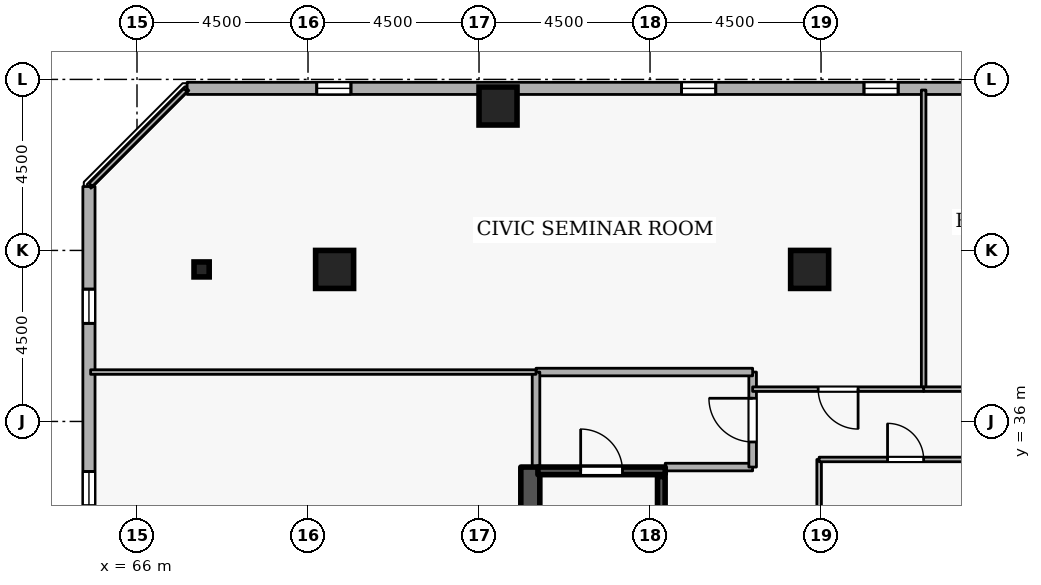
"""IFC4 building model, lengths in metres.
Left out: names, types, materials, properties, quantities, classifications, styles, units other than length and angle.
Written with IfcOpenShell. Run it as: python <this file> out.ifc"""

import sys

from ifc_helpers import new_model, si_unit, direction, frame, frame_2d, origin, origin_2d, place, context, subcontext, project, spatial, rectangle, i_section, extrude, element, fill, save


model = new_model("IFC4")
c1 = context("Model", 3, precision=1e-05, world=origin(), true_north=direction((0.0, 1.0)))
c2 = subcontext(c1, "Body", "Model", "MODEL_VIEW")
j1 = project(units=[si_unit("LENGTHUNIT", "METRE"), si_unit("PLANEANGLEUNIT", "RADIAN")], contexts=[c1])
p1 = place(None, origin())
s1 = spatial("IfcSite", under=j1, at=p1, CompositionType="ELEMENT")
p2 = place(p1, origin())
s2 = spatial("IfcBuilding", under=s1, at=p2, CompositionType="ELEMENT")
p3 = place(p2, frame((0.0, 0.0, 214.5)))
s3 = spatial("IfcBuildingStorey", under=s2, at=p3, CompositionType="ELEMENT", Elevation=214.5)
p4 = place(p3, frame((76.35, 19.2, 0.0), z_axis=(0.0, 0.0, 1.0), x_axis=(0.0, 1.0, 0.0)))
e1 = element("IfcWall", 1, at=p4, inside=s3, PredefinedType="SHEAR", context=c2, shape_type="SweptSolid", body=[
    extrude(rectangle(XDim=15.6, YDim=0.5, at=frame_2d((7.8, 0.0))), origin(), (0.0, 0.0, 1.0), 3.6),
])
for number, where, z_axis, x_axis in (
    (2, (75.5, 44.3, 0.0), (0.0, 0.0, 1.0), (1.0, 0.0, 0.0)),
    (3, (71.2, 40.0, 0.0), (0.0, 0.0, 1.0), (1.0, 0.0, 0.0)),
    (4, (83.7, 40.0, 0.0), (0.0, 0.0, 1.0), (1.0, 0.0, 0.0)),
):
    element("IfcColumn", number, at=place(p3, frame(where, z_axis=z_axis, x_axis=x_axis)), inside=s3, PredefinedType="COLUMN", context=c2, shape_type="SweptSolid", body=[
        extrude(rectangle(XDim=1.0, YDim=1.0, at=origin_2d()), origin(), (0.0, 0.0, 1.0), 3.6),
    ])
p5 = place(p3, frame((67.7, 40.0, 0.0), z_axis=(0.0, 0.0, 1.0), x_axis=(1.0, 0.0, 0.0)))
e5 = element("IfcColumn", 5, at=p5, inside=s3, PredefinedType="COLUMN", context=c2, shape_type="SweptSolid", body=[
    extrude(i_section(OverallWidth=0.399, OverallDepth=0.394, WebThickness=0.023, FlangeThickness=0.037, FilletRadius=0.015, at=origin_2d()), origin(), (0.0, 0.0, 1.0), 3.6),
])
p6 = place(p3, frame((103.129, 44.763, 0.0), z_axis=(0.0, 0.0, 1.0), x_axis=(-0.999999998513, 5.4540124e-05, 0.0)))
e6 = element("IfcWall", 6, at=p6, inside=s3, PredefinedType="STANDARD", context=c2, shape_type="SweptSolid", body=[
    extrude(rectangle(XDim=35.811, YDim=0.32, at=frame_2d((17.905, 0.0))), origin(), (0.0, 0.0, 1.0), 2.7),
])
p7 = place(p6, frame((2.7, 0.0, 0.72)))
e7 = element("IfcOpeningElement", 7, at=p7, cuts=e6, PredefinedType="OPENING", context=c2, shape_type="SweptSolid", body=[
    extrude(rectangle(XDim=0.9, YDim=1.75, at=frame_2d((0.45, 0.875))), frame((0.0, 0.17, 0.0), z_axis=(0.0, -1.0, 0.0), x_axis=(1.0, 0.0, 0.0)), (0.0, 0.0, 1.0), 0.34),
])
p8 = place(p6, frame((7.5, 0.0, 0.72)))
e8 = element("IfcOpeningElement", 8, at=p8, cuts=e6, PredefinedType="OPENING", context=c2, shape_type="SweptSolid", body=[
    extrude(rectangle(XDim=0.9, YDim=1.75, at=frame_2d((0.45, 0.875))), frame((0.0, 0.17, 0.0), z_axis=(0.0, -1.0, 0.0), x_axis=(1.0, 0.0, 0.0)), (0.0, 0.0, 1.0), 0.34),
])
p9 = place(p6, frame((12.3, 0.0, 0.72)))
e9 = element("IfcOpeningElement", 9, at=p9, cuts=e6, PredefinedType="OPENING", context=c2, shape_type="SweptSolid", body=[
    extrude(rectangle(XDim=0.9, YDim=1.75, at=frame_2d((0.45, 0.875))), frame((0.0, 0.17, 0.0), z_axis=(0.0, -1.0, 0.0), x_axis=(1.0, 0.0, 0.0)), (0.0, 0.0, 1.0), 0.34),
])
p10 = place(p6, frame((17.1, 0.0, 0.72)))
e10 = element("IfcOpeningElement", 10, at=p10, cuts=e6, PredefinedType="OPENING", context=c2, shape_type="SweptSolid", body=[
    extrude(rectangle(XDim=0.9, YDim=1.75, at=frame_2d((0.45, 0.875))), frame((0.0, 0.17, 0.0), z_axis=(0.0, -1.0, 0.0), x_axis=(1.0, 0.0, 0.0)), (0.0, 0.0, 1.0), 0.34),
])
p11 = place(p6, frame((21.9, 0.0, 0.72)))
e11 = element("IfcOpeningElement", 11, at=p11, cuts=e6, PredefinedType="OPENING", context=c2, shape_type="SweptSolid", body=[
    extrude(rectangle(XDim=0.9, YDim=1.75, at=frame_2d((0.45, 0.875))), frame((0.0, 0.17, 0.0), z_axis=(0.0, -1.0, 0.0), x_axis=(1.0, 0.0, 0.0)), (0.0, 0.0, 1.0), 0.34),
])
p12 = place(p6, frame((31.5, 0.0, 0.72)))
e12 = element("IfcOpeningElement", 12, at=p12, cuts=e6, PredefinedType="OPENING", context=c2, shape_type="SweptSolid", body=[
    extrude(rectangle(XDim=0.9, YDim=1.75, at=frame_2d((0.45, 0.875))), frame((0.0, 0.17, 0.0), z_axis=(0.0, -1.0, 0.0), x_axis=(1.0, 0.0, 0.0)), (0.0, 0.0, 1.0), 0.34),
])
p13 = place(p3, frame((64.735, 42.181, 0.0), z_axis=(0.0, 0.0, 1.0), x_axis=(5.4540124e-05, -0.999999998513, 0.0)))
e13 = element("IfcWall", 13, at=p13, inside=s3, PredefinedType="STANDARD", context=c2, shape_type="SweptSolid", body=[
    extrude(rectangle(XDim=35.811, YDim=0.32, at=frame_2d((17.905, 0.0))), origin(), (0.0, 0.0, 1.0), 2.7),
])
p14 = place(p13, frame((2.7, 0.0, 0.72)))
e14 = element("IfcOpeningElement", 14, at=p14, cuts=e13, PredefinedType="OPENING", context=c2, shape_type="SweptSolid", body=[
    extrude(rectangle(XDim=0.9, YDim=1.75, at=frame_2d((0.45, 0.875))), frame((0.0, 0.17, 0.0), z_axis=(0.0, -1.0, 0.0), x_axis=(1.0, 0.0, 0.0)), (0.0, 0.0, 1.0), 0.34),
])
p15 = place(p13, frame((7.5, 0.0, 0.72)))
e15 = element("IfcOpeningElement", 15, at=p15, cuts=e13, PredefinedType="OPENING", context=c2, shape_type="SweptSolid", body=[
    extrude(rectangle(XDim=0.9, YDim=1.75, at=frame_2d((0.45, 0.875))), frame((0.0, 0.17, 0.0), z_axis=(0.0, -1.0, 0.0), x_axis=(1.0, 0.0, 0.0)), (0.0, 0.0, 1.0), 0.34),
])
p16 = place(p13, frame((12.3, 0.0, 0.72)))
e16 = element("IfcOpeningElement", 16, at=p16, cuts=e13, PredefinedType="OPENING", context=c2, shape_type="SweptSolid", body=[
    extrude(rectangle(XDim=0.9, YDim=1.75, at=frame_2d((0.45, 0.875))), frame((0.0, 0.17, 0.0), z_axis=(0.0, -1.0, 0.0), x_axis=(1.0, 0.0, 0.0)), (0.0, 0.0, 1.0), 0.34),
])
p17 = place(p13, frame((17.1, 0.0, 0.72)))
e17 = element("IfcOpeningElement", 17, at=p17, cuts=e13, PredefinedType="OPENING", context=c2, shape_type="SweptSolid", body=[
    extrude(rectangle(XDim=0.9, YDim=1.75, at=frame_2d((0.45, 0.875))), frame((0.0, 0.17, 0.0), z_axis=(0.0, -1.0, 0.0), x_axis=(1.0, 0.0, 0.0)), (0.0, 0.0, 1.0), 0.34),
])
p18 = place(p13, frame((31.5, 0.0, 0.72)))
e18 = element("IfcOpeningElement", 18, at=p18, cuts=e13, PredefinedType="OPENING", context=c2, shape_type="SweptSolid", body=[
    extrude(rectangle(XDim=0.9, YDim=1.75, at=frame_2d((0.45, 0.875))), frame((0.0, 0.17, 0.0), z_axis=(0.0, -1.0, 0.0), x_axis=(1.0, 0.0, 0.0)), (0.0, 0.0, 1.0), 0.34),
])
p19 = place(p3, frame((76.55, 34.7, 0.0), z_axis=(0.0, 0.0, 1.0), x_axis=(1.0, 0.0, 0.0)))
e19 = element("IfcWall", 19, at=p19, inside=s3, PredefinedType="SHEAR", context=c2, shape_type="SweptSolid", body=[
    extrude(rectangle(XDim=3.35, YDim=0.2, at=frame_2d((1.675, 0.0))), origin(), (0.0, 0.0, 1.0), 3.6),
])
p20 = place(p19, frame((1.125, 0.0, 0.0)))
e20 = element("IfcOpeningElement", 20, at=p20, cuts=e19, PredefinedType="OPENING", context=c2, shape_type="SweptSolid", body=[
    extrude(rectangle(XDim=1.1, YDim=2.1, at=frame_2d((0.55, 1.05))), frame((0.0, 0.11, 0.0), z_axis=(0.0, -1.0, 0.0), x_axis=(1.0, 0.0, 0.0)), (0.0, 0.0, 1.0), 0.22),
])
p21 = place(p3, frame((79.797, 27.45, 0.0), z_axis=(0.0, 0.0, 1.0), x_axis=(0.0, 1.0, 0.0)))
e21 = element("IfcWall", 21, at=p21, inside=s3, PredefinedType="SHEAR", context=c2, shape_type="SweptSolid", body=[
    extrude(rectangle(XDim=7.1, YDim=0.2, at=frame_2d((3.55, 0.0))), origin(), (0.0, 0.0, 1.0), 3.6),
])
p22 = place(p3, frame((79.9, 34.8, 0.0), z_axis=(0.0, 0.0, 1.0), x_axis=(1.0, 0.0, 0.0)))
e22 = element("IfcWall", 22, at=p22, inside=s3, PredefinedType="STANDARD", context=c2, shape_type="SweptSolid", body=[
    extrude(rectangle(XDim=2.3, YDim=0.2, at=frame_2d((1.15, 0.0))), origin(), (0.0, 0.0, 1.0), 2.545),
])
p23 = place(p3, frame((82.2, 34.8, 0.0), z_axis=(0.0, 0.0, 1.0), x_axis=(0.0, 1.0, 0.0)))
e23 = element("IfcWall", 23, at=p23, inside=s3, PredefinedType="STANDARD", context=c2, shape_type="SweptSolid", body=[
    extrude(rectangle(XDim=2.5, YDim=0.2, at=frame_2d((1.25, 0.0))), origin(), (0.0, 0.0, 1.0), 3.34),
])
p24 = place(p23, frame((0.66, 0.0, 0.0)))
e24 = element("IfcOpeningElement", 24, at=p24, cuts=e23, PredefinedType="OPENING", context=c2, shape_type="SweptSolid", body=[
    extrude(rectangle(XDim=1.15, YDim=2.1, at=frame_2d((0.575, 1.05))), frame((0.0, 0.11, 0.0), z_axis=(0.0, -1.0, 0.0), x_axis=(1.0, 0.0, 0.0)), (0.0, 0.0, 1.0), 0.22),
])
p25 = place(p3, frame((82.2, 37.3, 0.0), z_axis=(0.0, 0.0, 1.0), x_axis=(-1.0, 0.0, 0.0)))
e25 = element("IfcWall", 25, at=p25, inside=s3, PredefinedType="STANDARD", context=c2, shape_type="SweptSolid", body=[
    extrude(rectangle(XDim=5.7, YDim=0.2, at=frame_2d((2.85, 0.0))), origin(), (0.0, 0.0, 1.0), 3.34),
])
p26 = place(p3, frame((76.5, 37.3, 0.0), z_axis=(0.0, 0.0, 1.0), x_axis=(0.0, -1.0, 0.0)))
e26 = element("IfcWall", 26, at=p26, inside=s3, PredefinedType="STANDARD", context=c2, shape_type="SweptSolid", body=[
    extrude(rectangle(XDim=2.5, YDim=0.2, at=frame_2d((1.25, 0.0))), origin(), (0.0, 0.0, 1.0), 3.34),
])
p27 = place(p3, frame((86.7, 36.85, 0.0), z_axis=(0.0, 0.0, 1.0), x_axis=(0.0, 1.0, 0.0)))
e27 = element("IfcWall", 27, at=p27, inside=s3, PredefinedType="PARTITIONING", context=c2, shape_type="SweptSolid", body=[
    extrude(rectangle(XDim=7.87, YDim=0.12, at=frame_2d((3.935, 0.0))), origin(), (0.0, 0.0, 1.0), 3.34),
])
p28 = place(p3, frame((93.0, 36.85, 0.0), z_axis=(0.0, 0.0, 1.0), x_axis=(-1.0, 0.0, 0.0)))
e28 = element("IfcWall", 28, at=p28, inside=s3, PredefinedType="PARTITIONING", context=c2, shape_type="SweptSolid", body=[
    extrude(rectangle(XDim=6.3, YDim=0.12, at=frame_2d((3.15, 0.0))), origin(), (0.0, 0.0, 1.0), 3.34),
])
p29 = place(p28, frame((2.675, 0.0, 0.0)))
e29 = element("IfcOpeningElement", 29, at=p29, cuts=e28, PredefinedType="OPENING", context=c2, shape_type="SweptSolid", body=[
    extrude(rectangle(XDim=0.95, YDim=2.1, at=frame_2d((0.475, 1.05))), frame((0.0, 0.07, 0.0), z_axis=(0.0, -1.0, 0.0), x_axis=(1.0, 0.0, 0.0)), (0.0, 0.0, 1.0), 0.14),
])
p30 = place(p3, frame((76.5, 37.3, 0.0), z_axis=(0.0, 0.0, 1.0), x_axis=(-1.0, 0.0, 0.0)))
e30 = element("IfcWall", 30, at=p30, inside=s3, PredefinedType="PARTITIONING", context=c2, shape_type="SweptSolid", body=[
    extrude(rectangle(XDim=11.72, YDim=0.12, at=frame_2d((5.86, 0.0))), origin(), (0.0, 0.0, 1.0), 3.34),
])
p31 = place(p3, frame((64.78, 42.225, 0.0), z_axis=(0.0, 0.0, 1.0), x_axis=(0.707106781187, 0.707106781187, 0.0)))
e31 = element("IfcWall", 31, at=p31, inside=s3, PredefinedType="PARTITIONING", context=c2, shape_type="SweptSolid", body=[
    extrude(rectangle(XDim=3.528, YDim=0.12, at=frame_2d((1.764, 0.0))), origin(), (0.0, 0.0, 1.0), 3.34),
])
p32 = place(p3, frame((86.7, 36.85, 0.0), z_axis=(0.0, 0.0, 1.0), x_axis=(-1.0, 0.0, 0.0)))
e32 = element("IfcWall", 32, at=p32, inside=s3, PredefinedType="PARTITIONING", context=c2, shape_type="SweptSolid", body=[
    extrude(rectangle(XDim=4.5, YDim=0.12, at=frame_2d((2.25, 0.0))), origin(), (0.0, 0.0, 1.0), 3.34),
])
p33 = place(p32, frame((1.725, 0.0, 0.0)))
e33 = element("IfcOpeningElement", 33, at=p33, cuts=e32, PredefinedType="OPENING", context=c2, shape_type="SweptSolid", body=[
    extrude(rectangle(XDim=1.05, YDim=2.1, at=frame_2d((0.525, 1.05))), frame((0.0, 0.07, 0.0), z_axis=(0.0, -1.0, 0.0), x_axis=(1.0, 0.0, 0.0)), (0.0, 0.0, 1.0), 0.14),
])
p34 = place(p3, frame((83.95, 32.2, 0.0), z_axis=(0.0, 0.0, 1.0), x_axis=(0.0, 1.0, 0.0)))
e34 = element("IfcWall", 34, at=p34, inside=s3, PredefinedType="PARTITIONING", context=c2, shape_type="SweptSolid", body=[
    extrude(rectangle(XDim=2.8, YDim=0.12, at=frame_2d((1.4, 0.0))), origin(), (0.0, 0.0, 1.0), 3.34),
])
p35 = place(p3, frame((83.95, 35.0, 0.0), z_axis=(0.0, 0.0, 1.0), x_axis=(1.0, 0.0, 0.0)))
e35 = element("IfcWall", 35, at=p35, inside=s3, PredefinedType="PARTITIONING", context=c2, shape_type="SweptSolid", body=[
    extrude(rectangle(XDim=4.55, YDim=0.12, at=frame_2d((2.275, 0.0))), origin(), (0.0, 0.0, 1.0), 3.34),
])
p36 = place(p35, frame((1.8, 0.0, 0.0)))
e36 = element("IfcOpeningElement", 36, at=p36, cuts=e35, PredefinedType="OPENING", context=c2, shape_type="SweptSolid", body=[
    extrude(rectangle(XDim=0.95, YDim=2.1, at=frame_2d((0.475, 1.05))), frame((0.0, 0.07, 0.0), z_axis=(0.0, -1.0, 0.0), x_axis=(1.0, 0.0, 0.0)), (0.0, 0.0, 1.0), 0.14),
])
p37 = place(p10, origin())
e37 = element("IfcWindow", 37, at=p37, inside=s3, PartitioningType="SINGLE_PANEL", PredefinedType="WINDOW", context=c2, shape_type="SweptSolid", body=[
    extrude(rectangle(XDim=0.9, YDim=1.75, at=frame_2d((0.45, 0.875))), frame((0.0, 0.03, 0.0), z_axis=(0.0, -1.0, 0.0), x_axis=(1.0, 0.0, 0.0)), (0.0, 0.0, 1.0), 0.06),
])
fill(e10, e37)
p38 = place(p11, origin())
e38 = element("IfcWindow", 38, at=p38, inside=s3, PartitioningType="SINGLE_PANEL", PredefinedType="WINDOW", context=c2, shape_type="SweptSolid", body=[
    extrude(rectangle(XDim=0.9, YDim=1.75, at=frame_2d((0.45, 0.875))), frame((0.0, 0.03, 0.0), z_axis=(0.0, -1.0, 0.0), x_axis=(1.0, 0.0, 0.0)), (0.0, 0.0, 1.0), 0.06),
])
fill(e11, e38)
p39 = place(p12, origin())
e39 = element("IfcWindow", 39, at=p39, inside=s3, PartitioningType="SINGLE_PANEL", PredefinedType="WINDOW", context=c2, shape_type="SweptSolid", body=[
    extrude(rectangle(XDim=0.9, YDim=1.75, at=frame_2d((0.45, 0.875))), frame((0.0, 0.03, 0.0), z_axis=(0.0, -1.0, 0.0), x_axis=(1.0, 0.0, 0.0)), (0.0, 0.0, 1.0), 0.06),
])
fill(e12, e39)
p40 = place(p14, origin())
e40 = element("IfcWindow", 40, at=p40, inside=s3, PartitioningType="SINGLE_PANEL", PredefinedType="WINDOW", context=c2, shape_type="SweptSolid", body=[
    extrude(rectangle(XDim=0.9, YDim=1.75, at=frame_2d((0.45, 0.875))), frame((0.0, 0.03, 0.0), z_axis=(0.0, -1.0, 0.0), x_axis=(1.0, 0.0, 0.0)), (0.0, 0.0, 1.0), 0.06),
])
fill(e14, e40)
p41 = place(p15, origin())
e41 = element("IfcWindow", 41, at=p41, inside=s3, PartitioningType="SINGLE_PANEL", PredefinedType="WINDOW", context=c2, shape_type="SweptSolid", body=[
    extrude(rectangle(XDim=0.9, YDim=1.75, at=frame_2d((0.45, 0.875))), frame((0.0, 0.03, 0.0), z_axis=(0.0, -1.0, 0.0), x_axis=(1.0, 0.0, 0.0)), (0.0, 0.0, 1.0), 0.06),
])
fill(e15, e41)
p42 = place(p20, origin())
e42 = element("IfcDoor", 42, at=p42, inside=s3, OperationType="SINGLE_SWING_LEFT", PredefinedType="DOOR", context=c2, shape_type="SweptSolid", body=[
    extrude(rectangle(XDim=1.1, YDim=2.1, at=frame_2d((0.55, 1.05))), frame((0.0, 0.025, 0.0), z_axis=(0.0, -1.0, 0.0), x_axis=(1.0, 0.0, 0.0)), (0.0, 0.0, 1.0), 0.05),
])
fill(e20, e42)
p43 = place(p24, origin())
e43 = element("IfcDoor", 43, at=p43, inside=s3, OperationType="SINGLE_SWING_RIGHT", PredefinedType="DOOR", context=c2, shape_type="SweptSolid", body=[
    extrude(rectangle(XDim=1.15, YDim=2.1, at=frame_2d((0.575, 1.05))), frame((0.0, 0.025, 0.0), z_axis=(0.0, -1.0, 0.0), x_axis=(1.0, 0.0, 0.0)), (0.0, 0.0, 1.0), 0.05),
])
fill(e24, e43)
p44 = place(p33, origin())
e44 = element("IfcDoor", 44, at=p44, inside=s3, OperationType="SINGLE_SWING_LEFT", PredefinedType="DOOR", context=c2, shape_type="SweptSolid", body=[
    extrude(rectangle(XDim=1.05, YDim=2.1, at=frame_2d((0.525, 1.05))), frame((0.0, 0.025, 0.0), z_axis=(0.0, -1.0, 0.0), x_axis=(1.0, 0.0, 0.0)), (0.0, 0.0, 1.0), 0.05),
])
fill(e33, e44)
p45 = place(p36, origin())
e45 = element("IfcDoor", 45, at=p45, inside=s3, OperationType="SINGLE_SWING_LEFT", PredefinedType="DOOR", context=c2, shape_type="SweptSolid", body=[
    extrude(rectangle(XDim=0.95, YDim=2.1, at=frame_2d((0.475, 1.05))), frame((0.0, 0.025, 0.0), z_axis=(0.0, -1.0, 0.0), x_axis=(1.0, 0.0, 0.0)), (0.0, 0.0, 1.0), 0.05),
])
fill(e36, e45)
save(model, sys.argv[1])
